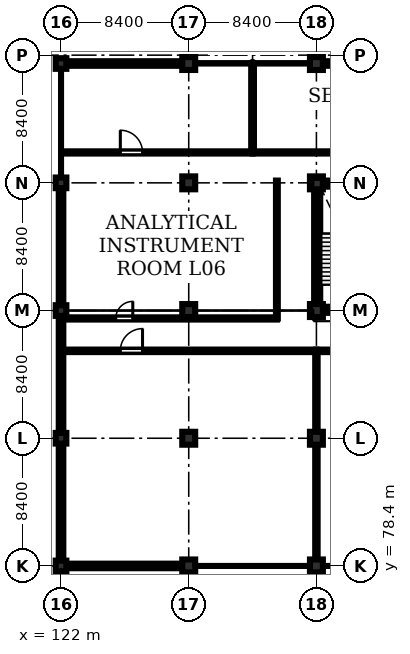
"""IFC4 building model, lengths in metres.
Left out: names, types, materials, properties, quantities, classifications, styles, units other than length and angle.
Written with IfcOpenShell. Run it as: python <this file> out.ifc"""

import sys

from ifc_helpers import new_model, si_unit, direction, frame, frame_2d, origin, origin_2d, place, context, subcontext, project, spatial, rectangle, extrude, element, fill, save


model = new_model("IFC4")
c1 = context("Model", 3, precision=1e-05, world=origin(), true_north=direction((0.0, 1.0)))
c2 = subcontext(c1, "Body", "Model", "MODEL_VIEW")
j1 = project(units=[si_unit("LENGTHUNIT", "METRE"), si_unit("PLANEANGLEUNIT", "RADIAN")], contexts=[c1])
p1 = place(None, origin())
s1 = spatial("IfcSite", under=j1, at=p1, CompositionType="ELEMENT")
p2 = place(p1, origin())
s2 = spatial("IfcBuilding", under=s1, at=p2, CompositionType="ELEMENT")
p3 = place(p2, frame((0.0, 0.0, 23.4)))
s3 = spatial("IfcBuildingStorey", under=s2, at=p3, CompositionType="ELEMENT", Elevation=23.4)
for number, where, z_axis, x_axis in (
    (1, (122.0, 78.4, 0.0), (0.0, 0.0, 1.0), (1.0, 0.0, 0.0)),
    (2, (122.0, 86.8, 0.0), (0.0, 0.0, 1.0), (1.0, 0.0, 0.0)),
    (3, (122.0, 95.2, 0.0), (0.0, 0.0, 1.0), (1.0, 0.0, 0.0)),
    (4, (122.0, 103.6, 0.0), (0.0, 0.0, 1.0), (1.0, 0.0, 0.0)),
    (5, (122.0, 111.45, 0.0), (0.0, 0.0, 1.0), (1.0, 0.0, 0.0)),
):
    element("IfcColumn", number, at=place(p3, frame(where, z_axis=z_axis, x_axis=x_axis)), inside=s3, PredefinedType="COLUMN", context=c2, shape_type="SweptSolid", body=[
        extrude(rectangle(XDim=0.7, YDim=0.7, at=origin_2d()), origin(), (0.0, 0.0, 1.0), 4.0),
    ])
for number, where, z_axis, x_axis in (
    (6, (130.4, 78.4, 0.0), (0.0, 0.0, 1.0), (1.0, 0.0, 0.0)),
    (7, (130.4, 86.8, 0.0), (0.0, 0.0, 1.0), (1.0, 0.0, 0.0)),
    (8, (130.4, 95.2, 0.0), (0.0, 0.0, 1.0), (1.0, 0.0, 0.0)),
    (9, (130.4, 103.6, 0.0), (0.0, 0.0, 1.0), (1.0, 0.0, 0.0)),
    (10, (130.4, 111.45, 0.0), (0.0, 0.0, 1.0), (1.0, 0.0, 0.0)),
    (11, (138.8, 78.4, 0.0), (0.0, 0.0, 1.0), (1.0, 0.0, 0.0)),
    (12, (138.8, 86.8, 0.0), (0.0, 0.0, 1.0), (1.0, 0.0, 0.0)),
    (13, (138.8, 95.2, 0.0), (0.0, 0.0, 1.0), (1.0, 0.0, 0.0)),
    (14, (138.8, 103.6, 0.0), (0.0, 0.0, 1.0), (1.0, 0.0, 0.0)),
    (15, (138.8, 111.45, 0.0), (0.0, 0.0, 1.0), (1.0, 0.0, 0.0)),
):
    element("IfcColumn", number, at=place(p3, frame(where, z_axis=z_axis, x_axis=x_axis)), inside=s3, PredefinedType="COLUMN", context=c2, shape_type="SweptSolid", body=[
        extrude(rectangle(XDim=0.85, YDim=0.85, at=origin_2d()), origin(), (0.0, 0.0, 1.0), 4.0),
    ])
for number, where, z_axis, x_axis in (
    (16, (138.65, 95.25, 0.0), (0.0, 0.0, 1.0), (1.0, 0.0, 0.0)),
    (17, (138.65, 103.55, 0.0), (0.0, 0.0, 1.0), (1.0, 0.0, 0.0)),
):
    element("IfcWall", number, at=place(p3, frame(where, z_axis=z_axis, x_axis=x_axis)), inside=s3, PredefinedType="SHEAR", context=c2, shape_type="SweptSolid", body=[
        extrude(rectangle(XDim=3.9, YDim=0.4, at=frame_2d((1.95, 0.0))), origin(), (0.0, 0.0, 1.0), 4.0),
    ])
p4 = place(p3, frame((138.85, 95.45, 0.0), z_axis=(0.0, 0.0, 1.0), x_axis=(0.0, 1.0, 0.0)))
e18 = element("IfcWall", 18, at=p4, inside=s3, PredefinedType="SHEAR", context=c2, shape_type="SweptSolid", body=[
    extrude(rectangle(XDim=7.9, YDim=0.4, at=frame_2d((3.95, 0.0))), origin(), (0.0, 0.0, 1.0), 4.0),
])
p5 = place(p3, frame((122.35, 111.45, 0.0), z_axis=(0.0, 0.0, 1.0), x_axis=(1.0, 0.0, 0.0)))
e19 = element("IfcWall", 19, at=p5, inside=s3, PredefinedType="STANDARD", context=c2, shape_type="SweptSolid", body=[
    extrude(rectangle(XDim=7.625, YDim=0.3, at=frame_2d((3.812, 0.0))), origin(), (0.0, 0.0, 1.0), 3.3),
])
p6 = place(p5, frame((0.85, 0.0, 0.9)))
e20 = element("IfcOpeningElement", 20, at=p6, cuts=e19, PredefinedType="OPENING", context=c2, shape_type="SweptSolid", body=[
    extrude(rectangle(XDim=1.8, YDim=2.1, at=frame_2d((0.9, 1.05))), frame((0.0, 0.16, 0.0), z_axis=(0.0, -1.0, 0.0), x_axis=(1.0, 0.0, 0.0)), (0.0, 0.0, 1.0), 0.32),
])
p7 = place(p5, frame((4.65, 0.0, 0.9)))
e21 = element("IfcOpeningElement", 21, at=p7, cuts=e19, PredefinedType="OPENING", context=c2, shape_type="SweptSolid", body=[
    extrude(rectangle(XDim=1.8, YDim=2.1, at=frame_2d((0.9, 1.05))), frame((0.0, 0.16, 0.0), z_axis=(0.0, -1.0, 0.0), x_axis=(1.0, 0.0, 0.0)), (0.0, 0.0, 1.0), 0.32),
])
p8 = place(p3, frame((139.225, 111.45, 0.0), z_axis=(0.0, 0.0, 1.0), x_axis=(1.0, 0.0, 0.0)))
e22 = element("IfcWall", 22, at=p8, inside=s3, PredefinedType="STANDARD", context=c2, shape_type="SweptSolid", body=[
    extrude(rectangle(XDim=7.55, YDim=0.3, at=frame_2d((3.775, 0.0))), origin(), (0.0, 0.0, 1.0), 3.3),
])
p9 = place(p8, frame((0.85, 0.0, 0.9)))
e23 = element("IfcOpeningElement", 23, at=p9, cuts=e22, PredefinedType="OPENING", context=c2, shape_type="SweptSolid", body=[
    extrude(rectangle(XDim=1.8, YDim=2.1, at=frame_2d((0.9, 1.05))), frame((0.0, 0.16, 0.0), z_axis=(0.0, -1.0, 0.0), x_axis=(1.0, 0.0, 0.0)), (0.0, 0.0, 1.0), 0.32),
])
p10 = place(p8, frame((4.65, 0.0, 0.9)))
e24 = element("IfcOpeningElement", 24, at=p10, cuts=e22, PredefinedType="OPENING", context=c2, shape_type="SweptSolid", body=[
    extrude(rectangle(XDim=1.8, YDim=2.1, at=frame_2d((0.9, 1.05))), frame((0.0, 0.16, 0.0), z_axis=(0.0, -1.0, 0.0), x_axis=(1.0, 0.0, 0.0)), (0.0, 0.0, 1.0), 0.32),
])
p11 = place(p3, frame((129.975, 78.4, 0.0), z_axis=(0.0, 0.0, 1.0), x_axis=(-1.0, 0.0, 0.0)))
e25 = element("IfcWall", 25, at=p11, inside=s3, PredefinedType="STANDARD", context=c2, shape_type="SweptSolid", body=[
    extrude(rectangle(XDim=7.625, YDim=0.3, at=frame_2d((3.812, 0.0))), origin(), (0.0, 0.0, 1.0), 4.0),
])
p12 = place(p11, frame((1.15, 0.0, 0.95)))
e26 = element("IfcOpeningElement", 26, at=p12, cuts=e25, PredefinedType="OPENING", context=c2, shape_type="SweptSolid", body=[
    extrude(rectangle(XDim=1.7, YDim=2.05, at=frame_2d((0.85, 1.025))), frame((0.0, 0.16, 0.0), z_axis=(0.0, -1.0, 0.0), x_axis=(1.0, 0.0, 0.0)), (0.0, 0.0, 1.0), 0.32),
])
p13 = place(p3, frame((122.0, 78.75, 0.0), z_axis=(0.0, 0.0, 1.0), x_axis=(0.0, 1.0, 0.0)))
e27 = element("IfcWall", 27, at=p13, inside=s3, PredefinedType="STANDARD", context=c2, shape_type="SweptSolid", body=[
    extrude(rectangle(XDim=7.7, YDim=0.3, at=frame_2d((3.85, 0.0))), origin(), (0.0, 0.0, 1.0), 4.0),
])
p14 = place(p13, frame((2.4, 0.0, 0.95)))
e28 = element("IfcOpeningElement", 28, at=p14, cuts=e27, PredefinedType="OPENING", context=c2, shape_type="SweptSolid", body=[
    extrude(rectangle(XDim=1.5, YDim=1.8, at=frame_2d((0.75, 0.9))), frame((0.0, 0.16, 0.0), z_axis=(0.0, -1.0, 0.0), x_axis=(1.0, 0.0, 0.0)), (0.0, 0.0, 1.0), 0.32),
])
p15 = place(p3, frame((122.0, 87.15, 0.0), z_axis=(0.0, 0.0, 1.0), x_axis=(0.0, 1.0, 0.0)))
e29 = element("IfcWall", 29, at=p15, inside=s3, PredefinedType="STANDARD", context=c2, shape_type="SweptSolid", body=[
    extrude(rectangle(XDim=7.7, YDim=0.3, at=frame_2d((3.85, 0.0))), origin(), (0.0, 0.0, 1.0), 3.3),
])
p16 = place(p15, frame((2.4, 0.0, 0.95)))
e30 = element("IfcOpeningElement", 30, at=p16, cuts=e29, PredefinedType="OPENING", context=c2, shape_type="SweptSolid", body=[
    extrude(rectangle(XDim=1.5, YDim=1.8, at=frame_2d((0.75, 0.9))), frame((0.0, 0.16, 0.0), z_axis=(0.0, -1.0, 0.0), x_axis=(1.0, 0.0, 0.0)), (0.0, 0.0, 1.0), 0.32),
])
p17 = place(p3, frame((122.0, 95.55, 0.0), z_axis=(0.0, 0.0, 1.0), x_axis=(0.0, 1.0, 0.0)))
e31 = element("IfcWall", 31, at=p17, inside=s3, PredefinedType="STANDARD", context=c2, shape_type="SweptSolid", body=[
    extrude(rectangle(XDim=7.7, YDim=0.3, at=frame_2d((3.85, 0.0))), origin(), (0.0, 0.0, 1.0), 3.3),
])
p18 = place(p17, frame((2.4, 0.0, 1.0)))
e32 = element("IfcOpeningElement", 32, at=p18, cuts=e31, PredefinedType="OPENING", context=c2, shape_type="SweptSolid", body=[
    extrude(rectangle(XDim=1.8, YDim=1.8, at=frame_2d((0.9, 0.9))), frame((0.0, 0.16, 0.0), z_axis=(0.0, -1.0, 0.0), x_axis=(1.0, 0.0, 0.0)), (0.0, 0.0, 1.0), 0.32),
])
p19 = place(p3, frame((136.2, 94.68, 0.0), z_axis=(0.0, 0.0, 1.0), x_axis=(0.0, 1.0, 0.0)))
e33 = element("IfcWall", 33, at=p19, inside=s3, PredefinedType="PARTITIONING", context=c2, shape_type="SweptSolid", body=[
    extrude(rectangle(XDim=9.07, YDim=0.12, at=frame_2d((4.535, 0.0))), origin(), (0.0, 0.0, 1.0), 4.0),
])
p20 = place(p3, frame((122.4, 94.68, 0.0), z_axis=(0.0, 0.0, 1.0), x_axis=(1.0, 0.0, 0.0)))
e34 = element("IfcWall", 34, at=p20, inside=s3, PredefinedType="PARTITIONING", context=c2, shape_type="SweptSolid", body=[
    extrude(rectangle(XDim=13.8, YDim=0.145, at=frame_2d((6.9, 0.0))), origin(), (0.0, 0.0, 1.0), 4.0),
])
p21 = place(p20, frame((3.2, 0.0, 0.0)))
e35 = element("IfcOpeningElement", 35, at=p21, cuts=e34, PredefinedType="OPENING", context=c2, shape_type="SweptSolid", body=[
    extrude(rectangle(XDim=1.12, YDim=2.18, at=frame_2d((0.56, 1.09))), frame((0.0, 0.083, 0.0), z_axis=(0.0, -1.0, 0.0), x_axis=(1.0, 0.0, 0.0)), (0.0, 0.0, 1.0), 0.165),
])
p22 = place(p3, frame((122.15, 105.6, 0.0), z_axis=(0.0, 0.0, 1.0), x_axis=(1.0, 0.0, 0.0)))
e36 = element("IfcWall", 36, at=p22, inside=s3, PredefinedType="PARTITIONING", context=c2, shape_type="SweptSolid", body=[
    extrude(rectangle(XDim=12.45, YDim=0.145, at=frame_2d((6.225, 0.0))), origin(), (0.0, 0.0, 1.0), 4.0),
])
p23 = place(p22, frame((3.75, 0.0, 0.0)))
e37 = element("IfcOpeningElement", 37, at=p23, cuts=e36, PredefinedType="OPENING", context=c2, shape_type="SweptSolid", body=[
    extrude(rectangle(XDim=1.46, YDim=2.22, at=frame_2d((0.73, 1.11))), frame((0.0, 0.083, 0.0), z_axis=(0.0, -1.0, 0.0), x_axis=(1.0, 0.0, 0.0)), (0.0, 0.0, 1.0), 0.165),
])
p24 = place(p3, frame((134.6, 105.6, 0.0), z_axis=(0.0, 0.0, 1.0), x_axis=(1.0, 0.0, 0.0)))
e38 = element("IfcWall", 38, at=p24, inside=s3, PredefinedType="PARTITIONING", context=c2, shape_type="SweptSolid", body=[
    extrude(rectangle(XDim=16.8, YDim=0.145, at=frame_2d((8.4, 0.0))), origin(), (0.0, 0.0, 1.0), 4.0),
])
p25 = place(p24, frame((6.8, 0.0, 0.0)))
e39 = element("IfcOpeningElement", 39, at=p25, cuts=e38, PredefinedType="OPENING", context=c2, shape_type="SweptSolid", body=[
    extrude(rectangle(XDim=1.46, YDim=2.22, at=frame_2d((0.73, 1.11))), frame((0.0, 0.083, 0.0), z_axis=(0.0, -1.0, 0.0), x_axis=(1.0, 0.0, 0.0)), (0.0, 0.0, 1.0), 0.165),
])
p26 = place(p3, frame((134.6, 105.6, 0.0), z_axis=(0.0, 0.0, 1.0), x_axis=(0.0, 1.0, 0.0)))
e40 = element("IfcWall", 40, at=p26, inside=s3, PredefinedType="STANDARD", context=c2, shape_type="SweptSolid", body=[
    extrude(rectangle(XDim=5.75, YDim=0.18, at=frame_2d((2.875, 0.0))), origin(), (0.0, 0.0, 1.0), 3.5),
])
p27 = place(p3, frame((122.15, 92.55, 0.0), z_axis=(0.0, 0.0, 1.0), x_axis=(1.0, 0.0, 0.0)))
e41 = element("IfcWall", 41, at=p27, inside=s3, PredefinedType="PARTITIONING", context=c2, shape_type="SweptSolid", body=[
    extrude(rectangle(XDim=16.65, YDim=0.165, at=frame_2d((8.325, 0.0))), origin(), (0.0, 0.0, 1.0), 4.0),
])
p28 = place(p27, frame((3.75, 0.0, 0.0)))
e42 = element("IfcOpeningElement", 42, at=p28, cuts=e41, PredefinedType="OPENING", context=c2, shape_type="SweptSolid", body=[
    extrude(rectangle(XDim=1.46, YDim=2.22, at=frame_2d((0.73, 1.11))), frame((0.0, 0.093, 0.0), z_axis=(0.0, -1.0, 0.0), x_axis=(1.0, 0.0, 0.0)), (0.0, 0.0, 1.0), 0.185),
])
p29 = place(p3, frame((138.8, 92.55, 0.0), z_axis=(0.0, 0.0, 1.0), x_axis=(1.0, 0.0, 0.0)))
e43 = element("IfcWall", 43, at=p29, inside=s3, PredefinedType="PARTITIONING", context=c2, shape_type="SweptSolid", body=[
    extrude(rectangle(XDim=8.4, YDim=0.165, at=frame_2d((4.2, 0.0))), origin(), (0.0, 0.0, 1.0), 4.0),
])
p30 = place(p29, frame((3.4, 0.0, 0.0)))
e44 = element("IfcOpeningElement", 44, at=p30, cuts=e43, PredefinedType="OPENING", context=c2, shape_type="SweptSolid", body=[
    extrude(rectangle(XDim=1.12, YDim=2.18, at=frame_2d((0.56, 1.09))), frame((0.0, 0.093, 0.0), z_axis=(0.0, -1.0, 0.0), x_axis=(1.0, 0.0, 0.0)), (0.0, 0.0, 1.0), 0.185),
])
p31 = place(p3, frame((138.8, 78.55, 0.0), z_axis=(0.0, 0.0, 1.0), x_axis=(0.0, 1.0, 0.0)))
e45 = element("IfcWall", 45, at=p31, inside=s3, PredefinedType="PARTITIONING", context=c2, shape_type="SweptSolid", body=[
    extrude(rectangle(XDim=14.0, YDim=0.158, at=frame_2d((7.0, 0.0))), origin(), (0.0, 0.0, 1.0), 3.3),
])
p32 = place(p6, origin())
e46 = element("IfcWindow", 46, at=p32, inside=s3, PartitioningType="DOUBLE_PANEL_VERTICAL", PredefinedType="WINDOW", context=c2, shape_type="SweptSolid", body=[
    extrude(rectangle(XDim=1.8, YDim=2.1, at=frame_2d((0.9, 1.05))), frame((0.0, 0.03, 0.0), z_axis=(0.0, -1.0, 0.0), x_axis=(1.0, 0.0, 0.0)), (0.0, 0.0, 1.0), 0.06),
])
fill(e20, e46)
p33 = place(p7, origin())
e47 = element("IfcWindow", 47, at=p33, inside=s3, PartitioningType="DOUBLE_PANEL_VERTICAL", PredefinedType="WINDOW", context=c2, shape_type="SweptSolid", body=[
    extrude(rectangle(XDim=1.8, YDim=2.1, at=frame_2d((0.9, 1.05))), frame((0.0, 0.03, 0.0), z_axis=(0.0, -1.0, 0.0), x_axis=(1.0, 0.0, 0.0)), (0.0, 0.0, 1.0), 0.06),
])
fill(e21, e47)
p34 = place(p12, origin())
e48 = element("IfcWindow", 48, at=p34, inside=s3, PartitioningType="DOUBLE_PANEL_VERTICAL", PredefinedType="WINDOW", context=c2, shape_type="SweptSolid", body=[
    extrude(rectangle(XDim=1.7, YDim=2.05, at=frame_2d((0.85, 1.025))), frame((0.0, 0.03, 0.0), z_axis=(0.0, -1.0, 0.0), x_axis=(1.0, 0.0, 0.0)), (0.0, 0.0, 1.0), 0.06),
])
fill(e26, e48)
p35 = place(p14, origin())
e49 = element("IfcWindow", 49, at=p35, inside=s3, PartitioningType="DOUBLE_PANEL_VERTICAL", PredefinedType="WINDOW", context=c2, shape_type="SweptSolid", body=[
    extrude(rectangle(XDim=1.5, YDim=1.8, at=frame_2d((0.75, 0.9))), frame((0.0, 0.03, 0.0), z_axis=(0.0, -1.0, 0.0), x_axis=(1.0, 0.0, 0.0)), (0.0, 0.0, 1.0), 0.06),
])
fill(e28, e49)
p36 = place(p16, origin())
e50 = element("IfcWindow", 50, at=p36, inside=s3, PartitioningType="DOUBLE_PANEL_VERTICAL", PredefinedType="WINDOW", context=c2, shape_type="SweptSolid", body=[
    extrude(rectangle(XDim=1.5, YDim=1.8, at=frame_2d((0.75, 0.9))), frame((0.0, 0.03, 0.0), z_axis=(0.0, -1.0, 0.0), x_axis=(1.0, 0.0, 0.0)), (0.0, 0.0, 1.0), 0.06),
])
fill(e30, e50)
p37 = place(p18, origin())
e51 = element("IfcWindow", 51, at=p37, inside=s3, PartitioningType="DOUBLE_PANEL_VERTICAL", PredefinedType="WINDOW", context=c2, shape_type="SweptSolid", body=[
    extrude(rectangle(XDim=1.8, YDim=1.8, at=frame_2d((0.9, 0.9))), frame((0.0, 0.03, 0.0), z_axis=(0.0, -1.0, 0.0), x_axis=(1.0, 0.0, 0.0)), (0.0, 0.0, 1.0), 0.06),
])
fill(e32, e51)
p38 = place(p21, origin())
e52 = element("IfcDoor", 52, at=p38, inside=s3, OperationType="SINGLE_SWING_RIGHT", PredefinedType="DOOR", context=c2, shape_type="SweptSolid", body=[
    extrude(rectangle(XDim=1.12, YDim=2.18, at=frame_2d((0.56, 1.09))), frame((0.0, 0.025, 0.0), z_axis=(0.0, -1.0, 0.0), x_axis=(1.0, 0.0, 0.0)), (0.0, 0.0, 1.0), 0.05),
])
fill(e35, e52)
p39 = place(p23, origin())
e53 = element("IfcDoor", 53, at=p39, inside=s3, OperationType="SINGLE_SWING_LEFT", PredefinedType="DOOR", context=c2, shape_type="SweptSolid", body=[
    extrude(rectangle(XDim=1.46, YDim=2.22, at=frame_2d((0.73, 1.11))), frame((0.0, 0.025, 0.0), z_axis=(0.0, -1.0, 0.0), x_axis=(1.0, 0.0, 0.0)), (0.0, 0.0, 1.0), 0.05),
])
fill(e37, e53)
p40 = place(p28, origin())
e54 = element("IfcDoor", 54, at=p40, inside=s3, OperationType="SINGLE_SWING_RIGHT", PredefinedType="DOOR", context=c2, shape_type="SweptSolid", body=[
    extrude(rectangle(XDim=1.46, YDim=2.22, at=frame_2d((0.73, 1.11))), frame((0.0, 0.025, 0.0), z_axis=(0.0, -1.0, 0.0), x_axis=(1.0, 0.0, 0.0)), (0.0, 0.0, 1.0), 0.05),
])
fill(e42, e54)
save(model, sys.argv[1])
